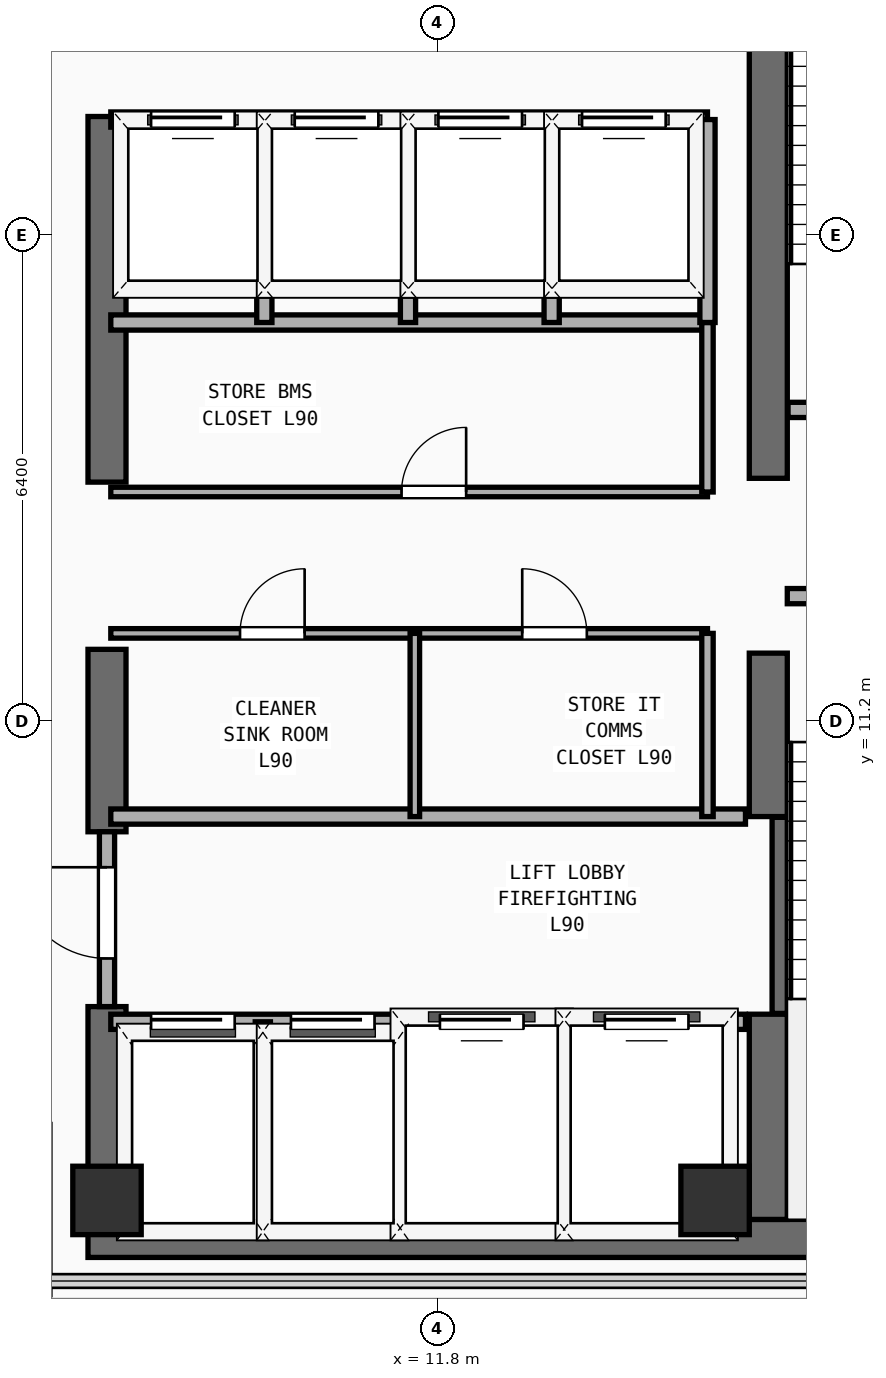
"""IFC4 building model, lengths in metres.
Left out: names, types, materials, properties, quantities, classifications, styles, units other than length and angle.
Written with IfcOpenShell. Run it as: python <this file> out.ifc"""

import sys

from ifc_helpers import new_model, si_unit, direction, frame, frame_2d, origin, origin_2d, place, context, subcontext, project, spatial, rectangle, extrude, element, fill, save


model = new_model("IFC4")
c1 = context("Model", 3, precision=1e-05, world=origin(), true_north=direction((0.0, 1.0)))
c2 = subcontext(c1, "Body", "Model", "MODEL_VIEW")
j1 = project(units=[si_unit("LENGTHUNIT", "METRE"), si_unit("PLANEANGLEUNIT", "RADIAN")], contexts=[c1])
p1 = place(None, origin())
s1 = spatial("IfcSite", under=j1, at=p1, CompositionType="ELEMENT")
p2 = place(p1, origin())
s2 = spatial("IfcBuilding", under=s1, at=p2, CompositionType="ELEMENT")
p3 = place(p2, frame((0.0, 0.0, 352.0)))
s3 = spatial("IfcBuildingStorey", under=s2, at=p3, CompositionType="ELEMENT", Elevation=352.0)
p4 = place(p3, frame((7.2, 4.4, 0.0), z_axis=(0.0, 0.0, 1.0), x_axis=(1.0, 0.0, 0.0)))
e1 = element("IfcWall", 1, at=p4, inside=s3, PredefinedType="SHEAR", context=c2, shape_type="SweptSolid", body=[
    extrude(rectangle(XDim=13.85, YDim=0.5, at=frame_2d((6.925, 0.0))), origin(), (0.0, 0.0, 1.0), 3.82),
])
p5 = place(p3, frame((7.45, 4.65, 0.0), z_axis=(0.0, 0.0, 1.0), x_axis=(0.0, 1.0, 0.0)))
e2 = element("IfcWall", 2, at=p5, inside=s3, PredefinedType="SHEAR", context=c2, shape_type="SweptSolid", body=[
    extrude(rectangle(XDim=2.8, YDim=0.5, at=frame_2d((1.4, 0.0))), origin(), (0.0, 0.0, 1.0), 3.82),
])
p6 = place(p3, frame((7.45, 9.75, 0.0), z_axis=(0.0, 0.0, 1.0), x_axis=(0.0, 1.0, 0.0)))
e3 = element("IfcWall", 3, at=p6, inside=s3, PredefinedType="SHEAR", context=c2, shape_type="SweptSolid", body=[
    extrude(rectangle(XDim=2.4, YDim=0.5, at=frame_2d((1.2, 0.0))), origin(), (0.0, 0.0, 1.0), 3.82),
])
p7 = place(p3, frame((7.45, 14.35, 0.0), z_axis=(0.0, 0.0, 1.0), x_axis=(0.0, 1.0, 0.0)))
e4 = element("IfcWall", 4, at=p7, inside=s3, PredefinedType="SHEAR", context=c2, shape_type="SweptSolid", body=[
    extrude(rectangle(XDim=4.81, YDim=0.5, at=frame_2d((2.405, 0.0))), origin(), (0.0, 0.0, 1.0), 3.82),
])
p8 = place(p3, frame((16.15, 4.65, 0.0), z_axis=(0.0, 0.0, 1.0), x_axis=(0.0, 1.0, 0.0)))
e5 = element("IfcWall", 5, at=p8, inside=s3, PredefinedType="SHEAR", context=c2, shape_type="SweptSolid", body=[
    extrude(rectangle(XDim=2.7, YDim=0.5, at=frame_2d((1.35, 0.0))), origin(), (0.0, 0.0, 1.0), 3.82),
])
p9 = place(p3, frame((16.15, 9.95, 0.0), z_axis=(0.0, 0.0, 1.0), x_axis=(0.0, 1.0, 0.0)))
e6 = element("IfcWall", 6, at=p9, inside=s3, PredefinedType="SHEAR", context=c2, shape_type="SweptSolid", body=[
    extrude(rectangle(XDim=2.15, YDim=0.5, at=frame_2d((1.075, 0.0))), origin(), (0.0, 0.0, 1.0), 3.82),
])
p10 = place(p3, frame((16.15, 14.4, 0.0), z_axis=(0.0, 0.0, 1.0), x_axis=(0.0, 1.0, 0.0)))
e7 = element("IfcWall", 7, at=p10, inside=s3, PredefinedType="SHEAR", context=c2, shape_type="SweptSolid", body=[
    extrude(rectangle(XDim=9.1, YDim=0.5, at=frame_2d((4.55, 0.0))), origin(), (0.0, 0.0, 1.0), 3.82),
])
for number, where, z_axis, x_axis in (
    (8, (7.45, 4.9, 0.0), (0.0, 0.0, 1.0), (1.0, 0.0, 0.0)),
    (9, (15.45, 4.9, 0.0), (0.0, 0.0, 1.0), (1.0, 0.0, 0.0)),
):
    element("IfcColumn", number, at=place(p3, frame(where, z_axis=z_axis, x_axis=x_axis)), inside=s3, PredefinedType="COLUMN", context=c2, shape_type="SweptSolid", body=[
        extrude(rectangle(XDim=0.9, YDim=0.9, at=origin_2d()), origin(), (0.0, 0.0, 1.0), 3.82),
    ])
p11 = place(p3, frame((16.3, 7.36, 0.0), z_axis=(0.0, 0.0, 1.0), x_axis=(0.0, 1.0, 0.0)))
e10 = element("IfcWall", 10, at=p11, inside=s3, PredefinedType="SHEAR", context=c2, shape_type="SweptSolid", body=[
    extrude(rectangle(XDim=2.58, YDim=0.2, at=frame_2d((1.29, 0.0))), origin(), (0.0, 0.0, 1.0), 3.82),
])
p12 = place(p3, frame((16.4, 12.85, 0.0), z_axis=(0.0, 0.0, 1.0), x_axis=(1.0, 0.0, 0.0)))
e11 = element("IfcWall", 11, at=p12, inside=s3, PredefinedType="PARTITIONING", context=c2, shape_type="SweptSolid", body=[
    extrude(rectangle(XDim=3.96, YDim=0.2, at=frame_2d((1.98, 0.0))), origin(), (0.0, 0.0, 1.0), 3.82),
])
p13 = place(p12, frame((1.304, 0.0, 0.0)))
e12 = element("IfcOpeningElement", 12, at=p13, cuts=e11, PredefinedType="OPENING", context=c2, shape_type="SweptSolid", body=[
    extrude(rectangle(XDim=1.1, YDim=2.2, at=frame_2d((0.55, 1.1))), frame((0.0, 0.11, 0.0), z_axis=(0.0, -1.0, 0.0), x_axis=(1.0, 0.0, 0.0)), (0.0, 0.0, 1.0), 0.22),
])
p14 = place(p3, frame((16.41, 15.3, 0.0), z_axis=(0.0, 0.0, 1.0), x_axis=(1.0, 0.0, 0.0)))
e13 = element("IfcWall", 13, at=p14, inside=s3, PredefinedType="PARTITIONING", context=c2, shape_type="SweptSolid", body=[
    extrude(rectangle(XDim=3.95, YDim=0.2, at=frame_2d((1.975, 0.0))), origin(), (0.0, 0.0, 1.0), 3.82),
])
p15 = place(p14, frame((1.294, 0.0, 0.0)))
e14 = element("IfcOpeningElement", 14, at=p15, cuts=e13, PredefinedType="OPENING", context=c2, shape_type="SweptSolid", body=[
    extrude(rectangle(XDim=1.1, YDim=2.2, at=frame_2d((0.55, 1.1))), frame((0.0, 0.11, 0.0), z_axis=(0.0, -1.0, 0.0), x_axis=(1.0, 0.0, 0.0)), (0.0, 0.0, 1.0), 0.22),
])
p16 = place(p3, frame((7.5, 7.25, 0.0), z_axis=(0.0, 0.0, 1.0), x_axis=(1.0, 0.0, 0.0)))
e15 = element("IfcWall", 15, at=p16, inside=s3, PredefinedType="PARTITIONING", context=c2, shape_type="SweptSolid", body=[
    extrude(rectangle(XDim=8.35, YDim=0.2, at=frame_2d((4.175, 0.0))), origin(), (0.0, 0.0, 1.0), 3.82),
])
p17 = place(p16, frame((0.53, 0.0, 0.0)))
e16 = element("IfcOpeningElement", 16, at=p17, cuts=e15, PredefinedType="OPENING", context=c2, shape_type="SweptSolid", body=[
    extrude(rectangle(XDim=1.1, YDim=2.2, at=frame_2d((0.55, 1.1))), frame((0.0, 0.11, 0.0), z_axis=(0.0, -1.0, 0.0), x_axis=(1.0, 0.0, 0.0)), (0.0, 0.0, 1.0), 0.22),
])
p18 = place(p16, frame((2.37, 0.0, 0.0)))
e17 = element("IfcOpeningElement", 17, at=p18, cuts=e15, PredefinedType="OPENING", context=c2, shape_type="SweptSolid", body=[
    extrude(rectangle(XDim=1.1, YDim=2.2, at=frame_2d((0.55, 1.1))), frame((0.0, 0.11, 0.0), z_axis=(0.0, -1.0, 0.0), x_axis=(1.0, 0.0, 0.0)), (0.0, 0.0, 1.0), 0.22),
])
p19 = place(p16, frame((4.33, 0.0, 0.0)))
e18 = element("IfcOpeningElement", 18, at=p19, cuts=e15, PredefinedType="OPENING", context=c2, shape_type="SweptSolid", body=[
    extrude(rectangle(XDim=1.1, YDim=2.2, at=frame_2d((0.55, 1.1))), frame((0.0, 0.11, 0.0), z_axis=(0.0, -1.0, 0.0), x_axis=(1.0, 0.0, 0.0)), (0.0, 0.0, 1.0), 0.22),
])
p20 = place(p16, frame((6.5, 0.0, 0.0)))
e19 = element("IfcOpeningElement", 19, at=p20, cuts=e15, PredefinedType="OPENING", context=c2, shape_type="SweptSolid", body=[
    extrude(rectangle(XDim=1.1, YDim=2.2, at=frame_2d((0.55, 1.1))), frame((0.0, 0.11, 0.0), z_axis=(0.0, -1.0, 0.0), x_axis=(1.0, 0.0, 0.0)), (0.0, 0.0, 1.0), 0.22),
])
p21 = place(p3, frame((7.5, 9.95, 0.0), z_axis=(0.0, 0.0, 1.0), x_axis=(1.0, 0.0, 0.0)))
e20 = element("IfcWall", 20, at=p21, inside=s3, PredefinedType="PARTITIONING", context=c2, shape_type="SweptSolid", body=[
    extrude(rectangle(XDim=8.35, YDim=0.2, at=frame_2d((4.175, 0.0))), origin(), (0.0, 0.0, 1.0), 3.82),
])
for number, where, z_axis, x_axis in (
    (21, (9.5, 4.45, 0.0), (0.0, 0.0, 1.0), (0.0, 1.0, 0.0)),
    (22, (11.36, 4.45, 0.0), (0.0, 0.0, 1.0), (0.0, 1.0, 0.0)),
    (23, (13.46, 4.45, 0.0), (0.0, 0.0, 1.0), (0.0, 1.0, 0.0)),
):
    element("IfcWall", number, at=place(p3, frame(where, z_axis=z_axis, x_axis=x_axis)), inside=s3, PredefinedType="PARTITIONING", context=c2, shape_type="SweptSolid", body=[
        extrude(rectangle(XDim=2.8, YDim=0.2, at=frame_2d((1.4, 0.0))), origin(), (0.0, 0.0, 1.0), 3.82),
    ])
p22 = place(p3, frame((7.45, 7.45, 0.0), z_axis=(0.0, 0.0, 1.0), x_axis=(0.0, 1.0, 0.0)))
e24 = element("IfcWall", 24, at=p22, inside=s3, PredefinedType="PARTITIONING", context=c2, shape_type="SweptSolid", body=[
    extrude(rectangle(XDim=2.3, YDim=0.2, at=frame_2d((1.15, 0.0))), origin(), (0.0, 0.0, 1.0), 2.8),
])
p23 = place(p22, frame((0.633, 0.0, 0.0)))
e25 = element("IfcOpeningElement", 25, at=p23, cuts=e24, PredefinedType="OPENING", context=c2, shape_type="SweptSolid", body=[
    extrude(rectangle(XDim=1.2, YDim=2.25, at=frame_2d((0.6, 1.125))), frame((0.0, 0.11, 0.0), z_axis=(0.0, -1.0, 0.0), x_axis=(1.0, 0.0, 0.0)), (0.0, 0.0, 1.0), 0.22),
])
p24 = place(p3, frame((7.5, 16.45, 0.0), z_axis=(0.0, 0.0, 1.0), x_axis=(1.0, 0.0, 0.0)))
e26 = element("IfcWall", 26, at=p24, inside=s3, PredefinedType="PARTITIONING", context=c2, shape_type="SweptSolid", body=[
    extrude(rectangle(XDim=7.85, YDim=0.2, at=frame_2d((3.925, 0.0))), origin(), (0.0, 0.0, 1.0), 3.82),
])
p25 = place(p3, frame((7.5, 12.36, 0.0), z_axis=(0.0, 0.0, 1.0), x_axis=(1.0, 0.0, 0.0)))
e27 = element("IfcWall", 27, at=p25, inside=s3, PredefinedType="PARTITIONING", context=c2, shape_type="SweptSolid", body=[
    extrude(rectangle(XDim=7.85, YDim=0.125, at=frame_2d((3.925, 0.0))), origin(), (0.0, 0.0, 1.0), 3.82),
])
p26 = place(p25, frame((1.7, 0.0, 0.0)))
e28 = element("IfcOpeningElement", 28, at=p26, cuts=e27, PredefinedType="OPENING", context=c2, shape_type="SweptSolid", body=[
    extrude(rectangle(XDim=0.85, YDim=2.15, at=frame_2d((0.425, 1.075))), frame((0.0, 0.073, 0.0), z_axis=(0.0, -1.0, 0.0), x_axis=(1.0, 0.0, 0.0)), (0.0, 0.0, 1.0), 0.145),
])
p27 = place(p25, frame((5.413, 0.0, 0.0)))
e29 = element("IfcOpeningElement", 29, at=p27, cuts=e27, PredefinedType="OPENING", context=c2, shape_type="SweptSolid", body=[
    extrude(rectangle(XDim=0.85, YDim=2.15, at=frame_2d((0.425, 1.075))), frame((0.0, 0.073, 0.0), z_axis=(0.0, -1.0, 0.0), x_axis=(1.0, 0.0, 0.0)), (0.0, 0.0, 1.0), 0.145),
])
p28 = place(p3, frame((7.5, 14.22, 0.0), z_axis=(0.0, 0.0, 1.0), x_axis=(1.0, 0.0, 0.0)))
e30 = element("IfcWall", 30, at=p28, inside=s3, PredefinedType="PARTITIONING", context=c2, shape_type="SweptSolid", body=[
    extrude(rectangle(XDim=7.85, YDim=0.125, at=frame_2d((3.925, 0.0))), origin(), (0.0, 0.0, 1.0), 3.82),
])
p29 = place(p28, frame((3.825, 0.0, 0.0)))
e31 = element("IfcOpeningElement", 31, at=p29, cuts=e30, PredefinedType="OPENING", context=c2, shape_type="SweptSolid", body=[
    extrude(rectangle(XDim=0.85, YDim=2.15, at=frame_2d((0.425, 1.075))), frame((0.0, 0.073, 0.0), z_axis=(0.0, -1.0, 0.0), x_axis=(1.0, 0.0, 0.0)), (0.0, 0.0, 1.0), 0.145),
])
p30 = place(p3, frame((15.35, 9.95, 0.0), z_axis=(0.0, 0.0, 1.0), x_axis=(0.0, 1.0, 0.0)))
e32 = element("IfcWall", 32, at=p30, inside=s3, PredefinedType="PARTITIONING", context=c2, shape_type="SweptSolid", body=[
    extrude(rectangle(XDim=2.41, YDim=0.15, at=frame_2d((1.205, 0.0))), origin(), (0.0, 0.0, 1.0), 3.82),
])
p31 = place(p3, frame((15.35, 14.22, 0.0), z_axis=(0.0, 0.0, 1.0), x_axis=(0.0, 1.0, 0.0)))
e33 = element("IfcWall", 33, at=p31, inside=s3, PredefinedType="PARTITIONING", context=c2, shape_type="SweptSolid", body=[
    extrude(rectangle(XDim=2.23, YDim=0.15, at=frame_2d((1.115, 0.0))), origin(), (0.0, 0.0, 1.0), 3.82),
])
p32 = place(p3, frame((11.5, 9.95, 0.0), z_axis=(0.0, 0.0, 1.0), x_axis=(0.0, 1.0, 0.0)))
e34 = element("IfcWall", 34, at=p32, inside=s3, PredefinedType="PARTITIONING", context=c2, shape_type="SweptSolid", body=[
    extrude(rectangle(XDim=2.41, YDim=0.125, at=frame_2d((1.205, 0.0))), origin(), (0.0, 0.0, 1.0), 3.82),
])
p33 = place(p3, frame((7.5, 19.12, 0.0), z_axis=(0.0, 0.0, 1.0), x_axis=(1.0, 0.0, 0.0)))
e35 = element("IfcWall", 35, at=p33, inside=s3, PredefinedType="PARTITIONING", context=c2, shape_type="SweptSolid", body=[
    extrude(rectangle(XDim=7.85, YDim=0.2, at=frame_2d((3.925, 0.0))), origin(), (0.0, 0.0, 1.0), 3.82),
])
p34 = place(p33, frame((0.53, 0.0, 0.0)))
e36 = element("IfcOpeningElement", 36, at=p34, cuts=e35, PredefinedType="OPENING", context=c2, shape_type="SweptSolid", body=[
    extrude(rectangle(XDim=1.1, YDim=2.2, at=frame_2d((0.55, 1.1))), frame((0.0, 0.11, 0.0), z_axis=(0.0, -1.0, 0.0), x_axis=(1.0, 0.0, 0.0)), (0.0, 0.0, 1.0), 0.22),
])
p35 = place(p33, frame((2.42, 0.0, 0.0)))
e37 = element("IfcOpeningElement", 37, at=p35, cuts=e35, PredefinedType="OPENING", context=c2, shape_type="SweptSolid", body=[
    extrude(rectangle(XDim=1.1, YDim=2.2, at=frame_2d((0.55, 1.1))), frame((0.0, 0.11, 0.0), z_axis=(0.0, -1.0, 0.0), x_axis=(1.0, 0.0, 0.0)), (0.0, 0.0, 1.0), 0.22),
])
p36 = place(p33, frame((4.31, 0.0, 0.0)))
e38 = element("IfcOpeningElement", 38, at=p36, cuts=e35, PredefinedType="OPENING", context=c2, shape_type="SweptSolid", body=[
    extrude(rectangle(XDim=1.1, YDim=2.2, at=frame_2d((0.55, 1.1))), frame((0.0, 0.11, 0.0), z_axis=(0.0, -1.0, 0.0), x_axis=(1.0, 0.0, 0.0)), (0.0, 0.0, 1.0), 0.22),
])
p37 = place(p33, frame((6.2, 0.0, 0.0)))
e39 = element("IfcOpeningElement", 39, at=p37, cuts=e35, PredefinedType="OPENING", context=c2, shape_type="SweptSolid", body=[
    extrude(rectangle(XDim=1.1, YDim=2.2, at=frame_2d((0.55, 1.1))), frame((0.0, 0.11, 0.0), z_axis=(0.0, -1.0, 0.0), x_axis=(1.0, 0.0, 0.0)), (0.0, 0.0, 1.0), 0.22),
])
for number, where, z_axis, x_axis in (
    (40, (15.35, 16.45, 0.0), (0.0, 0.0, 1.0), (0.0, 1.0, 0.0)),
    (41, (9.52, 16.45, 0.0), (0.0, 0.0, 1.0), (0.0, 1.0, 0.0)),
    (42, (11.41, 16.45, 0.0), (0.0, 0.0, 1.0), (0.0, 1.0, 0.0)),
    (43, (13.3, 16.45, 0.0), (0.0, 0.0, 1.0), (0.0, 1.0, 0.0)),
):
    element("IfcWall", number, at=place(p3, frame(where, z_axis=z_axis, x_axis=x_axis)), inside=s3, PredefinedType="PARTITIONING", context=c2, shape_type="SweptSolid", body=[
        extrude(rectangle(XDim=2.67, YDim=0.2, at=frame_2d((1.335, 0.0))), origin(), (0.0, 0.0, 1.0), 3.82),
    ])
p38 = place(p17, origin())
e44 = element("IfcDoor", 44, at=p38, inside=s3, OperationType="SLIDING_TO_LEFT", PredefinedType="DOOR", context=c2, shape_type="SweptSolid", body=[
    extrude(rectangle(XDim=1.1, YDim=2.2, at=frame_2d((0.55, 1.1))), frame((0.0, 0.025, 0.0), z_axis=(0.0, -1.0, 0.0), x_axis=(1.0, 0.0, 0.0)), (0.0, 0.0, 1.0), 0.05),
])
fill(e16, e44)
p39 = place(p18, origin())
e45 = element("IfcDoor", 45, at=p39, inside=s3, OperationType="SLIDING_TO_LEFT", PredefinedType="DOOR", context=c2, shape_type="SweptSolid", body=[
    extrude(rectangle(XDim=1.1, YDim=2.2, at=frame_2d((0.55, 1.1))), frame((0.0, 0.025, 0.0), z_axis=(0.0, -1.0, 0.0), x_axis=(1.0, 0.0, 0.0)), (0.0, 0.0, 1.0), 0.05),
])
fill(e17, e45)
p40 = place(p19, origin())
e46 = element("IfcDoor", 46, at=p40, inside=s3, OperationType="SLIDING_TO_LEFT", PredefinedType="DOOR", context=c2, shape_type="SweptSolid", body=[
    extrude(rectangle(XDim=1.1, YDim=2.2, at=frame_2d((0.55, 1.1))), frame((0.0, 0.025, 0.0), z_axis=(0.0, -1.0, 0.0), x_axis=(1.0, 0.0, 0.0)), (0.0, 0.0, 1.0), 0.05),
])
fill(e18, e46)
p41 = place(p20, origin())
e47 = element("IfcDoor", 47, at=p41, inside=s3, OperationType="SLIDING_TO_LEFT", PredefinedType="DOOR", context=c2, shape_type="SweptSolid", body=[
    extrude(rectangle(XDim=1.1, YDim=2.2, at=frame_2d((0.55, 1.1))), frame((0.0, 0.025, 0.0), z_axis=(0.0, -1.0, 0.0), x_axis=(1.0, 0.0, 0.0)), (0.0, 0.0, 1.0), 0.05),
])
fill(e19, e47)
p42 = place(p23, frame((1.2, 0.0, 0.0), z_axis=(0.0, 0.0, 1.0), x_axis=(-1.0, 0.0, 0.0)))
e48 = element("IfcDoor", 48, at=p42, inside=s3, OperationType="SINGLE_SWING_LEFT", PredefinedType="DOOR", context=c2, shape_type="SweptSolid", body=[
    extrude(rectangle(XDim=1.2, YDim=2.25, at=frame_2d((0.6, 1.125))), frame((0.0, 0.025, 0.0), z_axis=(0.0, -1.0, 0.0), x_axis=(1.0, 0.0, 0.0)), (0.0, 0.0, 1.0), 0.05),
])
fill(e25, e48)
p43 = place(p26, origin())
e49 = element("IfcDoor", 49, at=p43, inside=s3, OperationType="SINGLE_SWING_RIGHT", PredefinedType="DOOR", context=c2, shape_type="SweptSolid", body=[
    extrude(rectangle(XDim=0.85, YDim=2.15, at=frame_2d((0.425, 1.075))), frame((0.0, 0.025, 0.0), z_axis=(0.0, -1.0, 0.0), x_axis=(1.0, 0.0, 0.0)), (0.0, 0.0, 1.0), 0.05),
])
fill(e28, e49)
p44 = place(p27, origin())
e50 = element("IfcDoor", 50, at=p44, inside=s3, OperationType="SINGLE_SWING_LEFT", PredefinedType="DOOR", context=c2, shape_type="SweptSolid", body=[
    extrude(rectangle(XDim=0.85, YDim=2.15, at=frame_2d((0.425, 1.075))), frame((0.0, 0.025, 0.0), z_axis=(0.0, -1.0, 0.0), x_axis=(1.0, 0.0, 0.0)), (0.0, 0.0, 1.0), 0.05),
])
fill(e29, e50)
p45 = place(p29, origin())
e51 = element("IfcDoor", 51, at=p45, inside=s3, OperationType="SINGLE_SWING_RIGHT", PredefinedType="DOOR", context=c2, shape_type="SweptSolid", body=[
    extrude(rectangle(XDim=0.85, YDim=2.15, at=frame_2d((0.425, 1.075))), frame((0.0, 0.025, 0.0), z_axis=(0.0, -1.0, 0.0), x_axis=(1.0, 0.0, 0.0)), (0.0, 0.0, 1.0), 0.05),
])
fill(e31, e51)
p46 = place(p34, origin())
e52 = element("IfcDoor", 52, at=p46, inside=s3, OperationType="SLIDING_TO_LEFT", PredefinedType="DOOR", context=c2, shape_type="SweptSolid", body=[
    extrude(rectangle(XDim=1.1, YDim=2.2, at=frame_2d((0.55, 1.1))), frame((0.0, 0.025, 0.0), z_axis=(0.0, -1.0, 0.0), x_axis=(1.0, 0.0, 0.0)), (0.0, 0.0, 1.0), 0.05),
])
fill(e36, e52)
p47 = place(p35, origin())
e53 = element("IfcDoor", 53, at=p47, inside=s3, OperationType="SLIDING_TO_LEFT", PredefinedType="DOOR", context=c2, shape_type="SweptSolid", body=[
    extrude(rectangle(XDim=1.1, YDim=2.2, at=frame_2d((0.55, 1.1))), frame((0.0, 0.025, 0.0), z_axis=(0.0, -1.0, 0.0), x_axis=(1.0, 0.0, 0.0)), (0.0, 0.0, 1.0), 0.05),
])
fill(e37, e53)
p48 = place(p36, origin())
e54 = element("IfcDoor", 54, at=p48, inside=s3, OperationType="SLIDING_TO_LEFT", PredefinedType="DOOR", context=c2, shape_type="SweptSolid", body=[
    extrude(rectangle(XDim=1.1, YDim=2.2, at=frame_2d((0.55, 1.1))), frame((0.0, 0.025, 0.0), z_axis=(0.0, -1.0, 0.0), x_axis=(1.0, 0.0, 0.0)), (0.0, 0.0, 1.0), 0.05),
])
fill(e38, e54)
p49 = place(p37, origin())
e55 = element("IfcDoor", 55, at=p49, inside=s3, OperationType="SLIDING_TO_LEFT", PredefinedType="DOOR", context=c2, shape_type="SweptSolid", body=[
    extrude(rectangle(XDim=1.1, YDim=2.2, at=frame_2d((0.55, 1.1))), frame((0.0, 0.025, 0.0), z_axis=(0.0, -1.0, 0.0), x_axis=(1.0, 0.0, 0.0)), (0.0, 0.0, 1.0), 0.05),
])
fill(e39, e55)
save(model, sys.argv[1])
